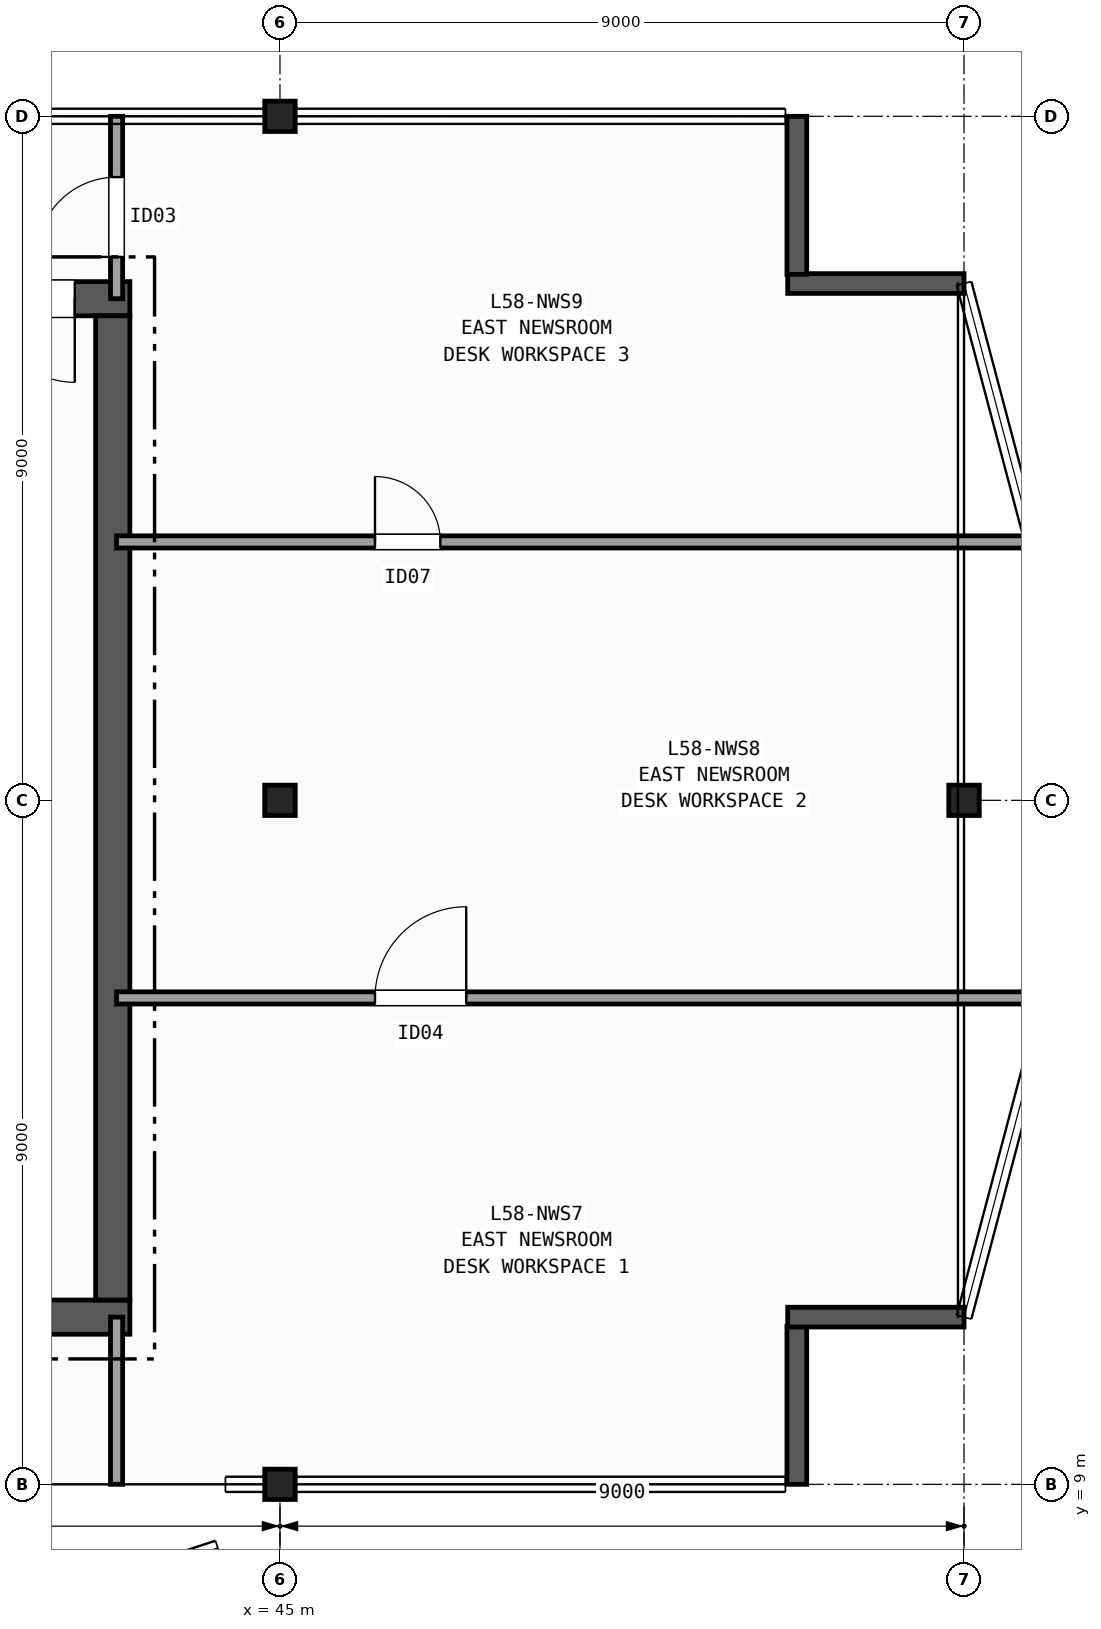
"""IFC4 building model, lengths in metres.
Left out: names, types, materials, properties, quantities, classifications, styles, units other than length and angle.
Written with IfcOpenShell. Run it as: python <this file> out.ifc"""

import sys

from ifc_helpers import new_model, si_unit, direction, frame, frame_2d, origin, origin_2d, place, context, subcontext, project, spatial, rectangle, i_section, extrude, element, fill, save


model = new_model("IFC4")
c1 = context("Model", 3, precision=1e-05, world=origin(), true_north=direction((0.0, 1.0)))
c2 = subcontext(c1, "Body", "Model", "MODEL_VIEW")
j1 = project(units=[si_unit("LENGTHUNIT", "METRE"), si_unit("PLANEANGLEUNIT", "RADIAN")], contexts=[c1])
p1 = place(None, origin())
s1 = spatial("IfcSite", under=j1, at=p1, CompositionType="ELEMENT")
p2 = place(p1, origin())
s2 = spatial("IfcBuilding", under=s1, at=p2, CompositionType="ELEMENT")
p3 = place(p2, frame((0.0, 0.0, 232.1)))
s3 = spatial("IfcBuildingStorey", under=s2, at=p3, CompositionType="ELEMENT", Elevation=232.1)
for number, where, z_axis, x_axis in (
    (1, (45.0, 9.0, 0.0), (0.0, 0.0, 1.0), (1.0, 0.0, 0.0)),
    (2, (45.0, 18.0, 0.0), (0.0, 0.0, 1.0), (1.0, 0.0, 0.0)),
    (3, (45.0, 27.0, 0.0), (0.0, 0.0, 1.0), (1.0, 0.0, 0.0)),
    (4, (54.0, 18.0, 0.0), (0.0, 0.0, 1.0), (1.0, 0.0, 0.0)),
):
    element("IfcColumn", number, at=place(p3, frame(where, z_axis=z_axis, x_axis=x_axis)), inside=s3, PredefinedType="COLUMN", context=c2, shape_type="SweptSolid", body=[
        extrude(i_section(OverallWidth=0.401, OverallDepth=0.399, WebThickness=0.025, FlangeThickness=0.04, FilletRadius=0.015, at=origin_2d()), origin(), (0.0, 0.0, 1.0), 3.7),
    ])
p4 = place(p3, frame((51.8, 9.0, 0.0), z_axis=(0.0, 0.0, 1.0), x_axis=(0.0, 1.0, 0.0)))
e5 = element("IfcWall", 5, at=p4, inside=s3, PredefinedType="SOLIDWALL", context=c2, shape_type="SweptSolid", body=[
    extrude(rectangle(XDim=2.08, YDim=0.26, at=frame_2d((1.04, 0.0))), origin(), (0.0, 0.0, 1.0), 3.37),
])
for number, where, z_axis, x_axis in (
    (6, (51.68, 11.2, 0.0), (0.0, 0.0, 1.0), (1.0, 0.0, 0.0)),
    (7, (54.0, 24.8, 0.0), (0.0, 0.0, 1.0), (-1.0, 0.0, 0.0)),
):
    element("IfcWall", number, at=place(p3, frame(where, z_axis=z_axis, x_axis=x_axis)), inside=s3, PredefinedType="SOLIDWALL", context=c2, shape_type="SweptSolid", body=[
        extrude(rectangle(XDim=2.32, YDim=0.26, at=frame_2d((1.16, 0.0))), origin(), (0.0, 0.0, 1.0), 3.37),
    ])
p5 = place(p3, frame((51.8, 24.92, 0.0), z_axis=(0.0, 0.0, 1.0), x_axis=(0.0, 1.0, 0.0)))
e8 = element("IfcWall", 8, at=p5, inside=s3, PredefinedType="SOLIDWALL", context=c2, shape_type="SweptSolid", body=[
    extrude(rectangle(XDim=2.08, YDim=0.26, at=frame_2d((1.04, 0.0))), origin(), (0.0, 0.0, 1.0), 3.37),
])
p6 = place(p3, frame((29.175, 11.2, 0.0), z_axis=(0.0, 0.0, 1.0), x_axis=(1.0, 0.0, 0.0)))
e9 = element("IfcWall", 9, at=p6, inside=s3, PredefinedType="SHEAR", context=c2, shape_type="SweptSolid", body=[
    extrude(rectangle(XDim=13.85, YDim=0.45, at=frame_2d((6.925, 0.0))), origin(), (0.0, 0.0, 1.0), 3.37),
])
p7 = place(p3, frame((43.025, 24.6, 0.0), z_axis=(0.0, 0.0, 1.0), x_axis=(-1.0, 0.0, 0.0)))
e10 = element("IfcWall", 10, at=p7, inside=s3, PredefinedType="SHEAR", context=c2, shape_type="SweptSolid", body=[
    extrude(rectangle(XDim=13.85, YDim=0.45, at=frame_2d((6.925, 0.0))), origin(), (0.0, 0.0, 1.0), 3.37),
])
p8 = place(p7, frame((0.725, 0.0, 0.0)))
e11 = element("IfcOpeningElement", 11, at=p8, cuts=e10, PredefinedType="OPENING", context=c2, shape_type="SweptSolid", body=[
    extrude(rectangle(XDim=1.1, YDim=2.15, at=frame_2d((0.55, 1.075))), frame((0.0, 0.235, 0.0), z_axis=(0.0, -1.0, 0.0), x_axis=(1.0, 0.0, 0.0)), (0.0, 0.0, 1.0), 0.47),
])
p9 = place(p7, frame((2.675, 0.0, 0.0)))
e12 = element("IfcOpeningElement", 12, at=p9, cuts=e10, PredefinedType="OPENING", context=c2, shape_type="SweptSolid", body=[
    extrude(rectangle(XDim=0.9, YDim=2.1, at=frame_2d((0.45, 1.05))), frame((0.0, 0.235, 0.0), z_axis=(0.0, -1.0, 0.0), x_axis=(1.0, 0.0, 0.0)), (0.0, 0.0, 1.0), 0.47),
])
p10 = place(p7, frame((4.575, 0.0, 0.0)))
e13 = element("IfcOpeningElement", 13, at=p10, cuts=e10, PredefinedType="OPENING", context=c2, shape_type="SweptSolid", body=[
    extrude(rectangle(XDim=0.9, YDim=2.1, at=frame_2d((0.45, 1.05))), frame((0.0, 0.235, 0.0), z_axis=(0.0, -1.0, 0.0), x_axis=(1.0, 0.0, 0.0)), (0.0, 0.0, 1.0), 0.47),
])
p11 = place(p3, frame((42.8, 11.425, 0.0), z_axis=(0.0, 0.0, 1.0), x_axis=(0.0, 1.0, 0.0)))
e14 = element("IfcWall", 14, at=p11, inside=s3, PredefinedType="SHEAR", context=c2, shape_type="SweptSolid", body=[
    extrude(rectangle(XDim=12.95, YDim=0.45, at=frame_2d((6.475, 0.0))), origin(), (0.0, 0.0, 1.0), 3.37),
])
p12 = place(p3, frame((42.85, 9.0, 0.0), z_axis=(0.0, 0.0, 1.0), x_axis=(0.0, 1.0, 0.0)))
e15 = element("IfcWall", 15, at=p12, inside=s3, PredefinedType="PARTITIONING", context=c2, shape_type="SweptSolid", body=[
    extrude(rectangle(XDim=2.2, YDim=0.16, at=frame_2d((1.1, 0.0))), origin(), (0.0, 0.0, 1.0), 2.657),
])
p13 = place(p3, frame((42.85, 24.6, 0.0), z_axis=(0.0, 0.0, 1.0), x_axis=(0.0, 1.0, 0.0)))
e16 = element("IfcWall", 16, at=p13, inside=s3, PredefinedType="PARTITIONING", context=c2, shape_type="SweptSolid", body=[
    extrude(rectangle(XDim=2.4, YDim=0.16, at=frame_2d((1.2, 0.0))), origin(), (0.0, 0.0, 1.0), 2.657),
])
p14 = place(p13, frame((0.55, 0.0, 0.0)))
e17 = element("IfcOpeningElement", 17, at=p14, cuts=e16, PredefinedType="OPENING", context=c2, shape_type="SweptSolid", body=[
    extrude(rectangle(XDim=1.05, YDim=2.15, at=frame_2d((0.525, 1.075))), frame((0.0, 0.09, 0.0), z_axis=(0.0, -1.0, 0.0), x_axis=(1.0, 0.0, 0.0)), (0.0, 0.0, 1.0), 0.18),
])
p15 = place(p3, frame((42.85, 15.4, 0.0), z_axis=(0.0, 0.0, 1.0), x_axis=(1.0, 0.0, 0.0)))
e18 = element("IfcWall", 18, at=p15, inside=s3, PredefinedType="PARTITIONING", context=c2, shape_type="SweptSolid", body=[
    extrude(rectangle(XDim=12.262, YDim=0.16, at=frame_2d((6.131, 0.0))), origin(), (0.0, 0.0, 1.0), 2.739),
])
p16 = place(p15, frame((3.4, 0.0, 0.0)))
e19 = element("IfcOpeningElement", 19, at=p16, cuts=e18, PredefinedType="OPENING", context=c2, shape_type="SweptSolid", body=[
    extrude(rectangle(XDim=1.2, YDim=2.15, at=frame_2d((0.6, 1.075))), frame((0.0, 0.09, 0.0), z_axis=(0.0, -1.0, 0.0), x_axis=(1.0, 0.0, 0.0)), (0.0, 0.0, 1.0), 0.18),
])
p17 = place(p3, frame((42.85, 21.4, 0.0), z_axis=(0.0, 0.0, 1.0), x_axis=(1.0, 0.0, 0.0)))
e20 = element("IfcWall", 20, at=p17, inside=s3, PredefinedType="PARTITIONING", context=c2, shape_type="SweptSolid", body=[
    extrude(rectangle(XDim=12.05, YDim=0.16, at=frame_2d((6.025, 0.0))), origin(), (0.0, 0.0, 1.0), 2.742),
])
p18 = place(p17, frame((3.4, 0.0, 0.0)))
e21 = element("IfcOpeningElement", 21, at=p18, cuts=e20, PredefinedType="OPENING", context=c2, shape_type="SweptSolid", body=[
    extrude(rectangle(XDim=0.86, YDim=2.05, at=frame_2d((0.43, 1.025))), frame((0.0, 0.09, 0.0), z_axis=(0.0, -1.0, 0.0), x_axis=(1.0, 0.0, 0.0)), (0.0, 0.0, 1.0), 0.18),
])
p19 = place(p8, origin())
e22 = element("IfcDoor", 22, at=p19, inside=s3, OperationType="SINGLE_SWING_LEFT", PredefinedType="DOOR", context=c2, shape_type="SweptSolid", body=[
    extrude(rectangle(XDim=1.1, YDim=2.15, at=frame_2d((0.55, 1.075))), frame((0.0, 0.025, 0.0), z_axis=(0.0, -1.0, 0.0), x_axis=(1.0, 0.0, 0.0)), (0.0, 0.0, 1.0), 0.05),
])
fill(e11, e22)
p20 = place(p14, origin())
e23 = element("IfcDoor", 23, at=p20, inside=s3, OperationType="SINGLE_SWING_LEFT", PredefinedType="DOOR", context=c2, shape_type="SweptSolid", body=[
    extrude(rectangle(XDim=1.05, YDim=2.15, at=frame_2d((0.525, 1.075))), frame((0.0, 0.025, 0.0), z_axis=(0.0, -1.0, 0.0), x_axis=(1.0, 0.0, 0.0)), (0.0, 0.0, 1.0), 0.05),
])
fill(e17, e23)
p21 = place(p16, origin())
e24 = element("IfcDoor", 24, at=p21, inside=s3, OperationType="SINGLE_SWING_RIGHT", PredefinedType="DOOR", context=c2, shape_type="SweptSolid", body=[
    extrude(rectangle(XDim=1.2, YDim=2.15, at=frame_2d((0.6, 1.075))), frame((0.0, 0.025, 0.0), z_axis=(0.0, -1.0, 0.0), x_axis=(1.0, 0.0, 0.0)), (0.0, 0.0, 1.0), 0.05),
])
fill(e19, e24)
p22 = place(p18, origin())
e25 = element("IfcDoor", 25, at=p22, inside=s3, OperationType="SINGLE_SWING_LEFT", PredefinedType="DOOR", context=c2, shape_type="SweptSolid", body=[
    extrude(rectangle(XDim=0.86, YDim=2.05, at=frame_2d((0.43, 1.025))), frame((0.0, 0.025, 0.0), z_axis=(0.0, -1.0, 0.0), x_axis=(1.0, 0.0, 0.0)), (0.0, 0.0, 1.0), 0.05),
])
fill(e21, e25)
save(model, sys.argv[1])
